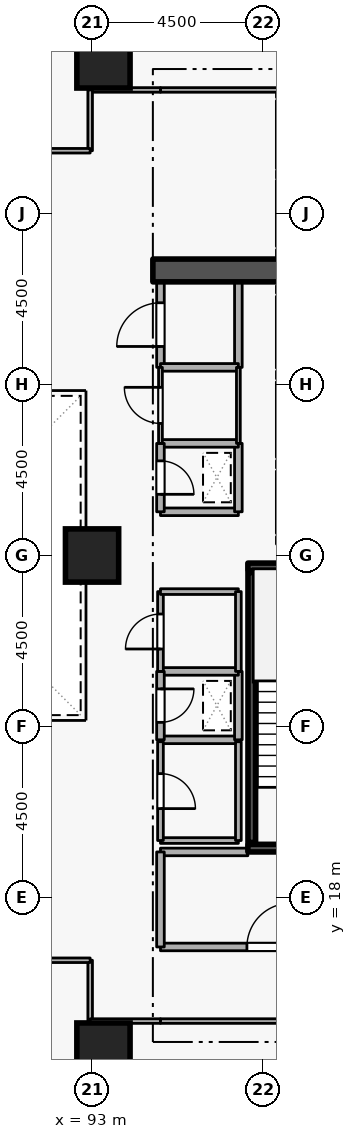
"""IFC4 building model, lengths in metres.
Left out: names, types, materials, properties, quantities, classifications, styles, units other than length and angle.
Written with IfcOpenShell. Run it as: python <this file> out.ifc"""

import sys

from ifc_helpers import new_model, si_unit, direction, frame, frame_2d, origin, origin_2d, place, context, subcontext, project, spatial, rectangle, extrude, element, fill, save


model = new_model("IFC4")
c1 = context("Model", 3, precision=1e-05, world=origin(), true_north=direction((0.0, 1.0)))
c2 = subcontext(c1, "Body", "Model", "MODEL_VIEW")
j1 = project(units=[si_unit("LENGTHUNIT", "METRE"), si_unit("PLANEANGLEUNIT", "RADIAN")], contexts=[c1])
p1 = place(None, origin())
s1 = spatial("IfcSite", under=j1, at=p1, CompositionType="ELEMENT")
p2 = place(p1, origin())
s2 = spatial("IfcBuilding", under=s1, at=p2, CompositionType="ELEMENT")
p3 = place(p2, frame((0.0, 0.0, 31.5)))
s3 = spatial("IfcBuildingStorey", under=s2, at=p3, CompositionType="ELEMENT", Elevation=31.5)
p4 = place(p3, frame((94.6, 34.5, 0.0), z_axis=(0.0, 0.0, 1.0), x_axis=(1.0, 0.0, 0.0)))
e1 = element("IfcWall", 1, at=p4, inside=s3, PredefinedType="SHEAR", context=c2, shape_type="SweptSolid", body=[
    extrude(rectangle(XDim=5.7, YDim=0.6, at=frame_2d((2.85, 0.0))), origin(), (0.0, 0.0, 1.0), 3.6),
])
for number, where, z_axis, x_axis in (
    (2, (93.3, 14.0, 0.0), (0.0, 0.0, 1.0), (1.0, 0.0, 0.0)),
    (3, (93.3, 40.0, 0.0), (0.0, 0.0, 1.0), (1.0, 0.0, 0.0)),
    (4, (93.0, 27.0, 0.0), (0.0, 0.0, 1.0), (1.0, 0.0, 0.0)),
):
    element("IfcColumn", number, at=place(p3, frame(where, z_axis=z_axis, x_axis=x_axis)), inside=s3, PredefinedType="COLUMN", context=c2, shape_type="SweptSolid", body=[
        extrude(rectangle(XDim=1.4, YDim=1.4, at=origin_2d()), origin(), (0.0, 0.0, 1.0), 3.6),
    ])
p5 = place(p3, frame((97.95, 29.22, 0.0), z_axis=(0.0, 0.0, 1.0), x_axis=(0.0, -1.0, 0.0)))
e5 = element("IfcWall", 5, at=p5, inside=s3, PredefinedType="STANDARD", context=c2, shape_type="SweptSolid", body=[
    extrude(rectangle(XDim=1.64, YDim=0.2, at=frame_2d((0.82, 0.0))), origin(), (0.0, 0.0, 1.0), 3.34),
])
p6 = place(p5, frame((0.31, 0.0, 0.0)))
e6 = element("IfcOpeningElement", 6, at=p6, cuts=e5, PredefinedType="OPENING", context=c2, shape_type="SweptSolid", body=[
    extrude(rectangle(XDim=1.02, YDim=2.06, at=frame_2d((0.51, 1.03))), frame((0.0, 0.11, 0.0), z_axis=(0.0, -1.0, 0.0), x_axis=(1.0, 0.0, 0.0)), (0.0, 0.0, 1.0), 0.22),
])
p7 = place(p3, frame((97.95, 31.57, 0.0), z_axis=(0.0, 0.0, 1.0), x_axis=(0.0, -1.0, 0.0)))
e7 = element("IfcWall", 7, at=p7, inside=s3, PredefinedType="STANDARD", context=c2, shape_type="SweptSolid", body=[
    extrude(rectangle(XDim=1.99, YDim=0.2, at=frame_2d((0.995, 0.0))), origin(), (0.0, 0.0, 1.0), 3.34),
])
p8 = place(p3, frame((97.95, 33.82, 0.0), z_axis=(0.0, 0.0, 1.0), x_axis=(0.0, -1.0, 0.0)))
e8 = element("IfcWall", 8, at=p8, inside=s3, PredefinedType="STANDARD", context=c2, shape_type="SweptSolid", body=[
    extrude(rectangle(XDim=1.89, YDim=0.2, at=frame_2d((0.945, 0.0))), origin(), (0.0, 0.0, 1.0), 3.34),
])
p9 = place(p8, frame((0.435, 0.0, 0.0)))
e9 = element("IfcOpeningElement", 9, at=p9, cuts=e8, PredefinedType="OPENING", context=c2, shape_type="SweptSolid", body=[
    extrude(rectangle(XDim=1.02, YDim=2.06, at=frame_2d((0.51, 1.03))), frame((0.0, 0.11, 0.0), z_axis=(0.0, -1.0, 0.0), x_axis=(1.0, 0.0, 0.0)), (0.0, 0.0, 1.0), 0.22),
])
p10 = place(p3, frame((97.95, 36.87, 0.0), z_axis=(0.0, 0.0, 1.0), x_axis=(0.0, -1.0, 0.0)))
e10 = element("IfcWall", 10, at=p10, inside=s3, PredefinedType="STANDARD", context=c2, shape_type="SweptSolid", body=[
    extrude(rectangle(XDim=1.74, YDim=0.2, at=frame_2d((0.87, 0.0))), origin(), (0.0, 0.0, 1.0), 3.34),
])
p11 = place(p10, frame((0.36, 0.0, 0.0)))
e11 = element("IfcOpeningElement", 11, at=p11, cuts=e10, PredefinedType="OPENING", context=c2, shape_type="SweptSolid", body=[
    extrude(rectangle(XDim=1.02, YDim=2.06, at=frame_2d((0.51, 1.03))), frame((0.0, 0.11, 0.0), z_axis=(0.0, -1.0, 0.0), x_axis=(1.0, 0.0, 0.0)), (0.0, 0.0, 1.0), 0.22),
])
p12 = place(p3, frame((97.95, 38.97, 0.0), z_axis=(0.0, 0.0, 1.0), x_axis=(0.0, -1.0, 0.0)))
e12 = element("IfcWall", 12, at=p12, inside=s3, PredefinedType="STANDARD", context=c2, shape_type="SweptSolid", body=[
    extrude(rectangle(XDim=1.79, YDim=0.2, at=frame_2d((0.895, 0.0))), origin(), (0.0, 0.0, 1.0), 3.34),
])
p13 = place(p12, frame((0.385, 0.0, 0.0)))
e13 = element("IfcOpeningElement", 13, at=p13, cuts=e12, PredefinedType="OPENING", context=c2, shape_type="SweptSolid", body=[
    extrude(rectangle(XDim=1.02, YDim=2.06, at=frame_2d((0.51, 1.03))), frame((0.0, 0.11, 0.0), z_axis=(0.0, -1.0, 0.0), x_axis=(1.0, 0.0, 0.0)), (0.0, 0.0, 1.0), 0.22),
])
p14 = place(p3, frame((100.45, 19.3, 0.0), z_axis=(0.0, 0.0, 1.0), x_axis=(-1.0, 0.0, 0.0)))
e14 = element("IfcWall", 14, at=p14, inside=s3, PredefinedType="SHEAR", context=c2, shape_type="SweptSolid", body=[
    extrude(rectangle(XDim=3.35, YDim=0.2, at=frame_2d((1.675, 0.0))), origin(), (0.0, 0.0, 1.0), 3.6),
])
p15 = place(p14, frame((1.125, 0.0, 0.0)))
e15 = element("IfcOpeningElement", 15, at=p15, cuts=e14, PredefinedType="OPENING", context=c2, shape_type="SweptSolid", body=[
    extrude(rectangle(XDim=1.1, YDim=2.1, at=frame_2d((0.55, 1.05))), frame((0.0, 0.11, 0.0), z_axis=(0.0, -1.0, 0.0), x_axis=(1.0, 0.0, 0.0)), (0.0, 0.0, 1.0), 0.22),
])
p16 = place(p3, frame((97.1, 26.7, 0.0), z_axis=(0.0, 0.0, 1.0), x_axis=(1.0, 0.0, 0.0)))
e16 = element("IfcWall", 16, at=p16, inside=s3, PredefinedType="SHEAR", context=c2, shape_type="SweptSolid", body=[
    extrude(rectangle(XDim=3.35, YDim=0.2, at=frame_2d((1.675, 0.0))), origin(), (0.0, 0.0, 1.0), 3.6),
])
p17 = place(p3, frame((97.203, 26.55, 0.0), z_axis=(0.0, 0.0, 1.0), x_axis=(0.0, -1.0, 0.0)))
e17 = element("IfcWall", 17, at=p17, inside=s3, PredefinedType="SHEAR", context=c2, shape_type="SweptSolid", body=[
    extrude(rectangle(XDim=7.1, YDim=0.2, at=frame_2d((3.55, 0.0))), origin(), (0.0, 0.0, 1.0), 3.6),
])
p18 = place(p3, frame((94.8, 16.7, 0.0), z_axis=(0.0, 0.0, 1.0), x_axis=(1.0, 0.0, 0.0)))
e18 = element("IfcWall", 18, at=p18, inside=s3, PredefinedType="STANDARD", context=c2, shape_type="SweptSolid", body=[
    extrude(rectangle(XDim=5.7, YDim=0.2, at=frame_2d((2.85, 0.0))), origin(), (0.0, 0.0, 1.0), 3.34),
])
p19 = place(p18, frame((2.275, 0.0, 0.0)))
e19 = element("IfcOpeningElement", 19, at=p19, cuts=e18, PredefinedType="OPENING", context=c2, shape_type="SweptSolid", body=[
    extrude(rectangle(XDim=1.15, YDim=2.1, at=frame_2d((0.575, 1.05))), frame((0.0, 0.11, 0.0), z_axis=(0.0, -1.0, 0.0), x_axis=(1.0, 0.0, 0.0)), (0.0, 0.0, 1.0), 0.22),
])
p20 = place(p3, frame((97.1, 19.2, 0.0), z_axis=(0.0, 0.0, 1.0), x_axis=(-1.0, 0.0, 0.0)))
e20 = element("IfcWall", 20, at=p20, inside=s3, PredefinedType="STANDARD", context=c2, shape_type="SweptSolid", body=[
    extrude(rectangle(XDim=2.3, YDim=0.2, at=frame_2d((1.15, 0.0))), origin(), (0.0, 0.0, 1.0), 2.545),
])
p21 = place(p3, frame((94.8, 19.2, 0.0), z_axis=(0.0, 0.0, 1.0), x_axis=(0.0, -1.0, 0.0)))
e21 = element("IfcWall", 21, at=p21, inside=s3, PredefinedType="STANDARD", context=c2, shape_type="SweptSolid", body=[
    extrude(rectangle(XDim=2.5, YDim=0.2, at=frame_2d((1.25, 0.0))), origin(), (0.0, 0.0, 1.0), 3.34),
])
p22 = place(p3, frame((94.8, 28.15, 0.0), z_axis=(0.0, 0.0, 1.0), x_axis=(1.0, 0.0, 0.0)))
e22 = element("IfcWall", 22, at=p22, inside=s3, PredefinedType="STANDARD", context=c2, shape_type="SweptSolid", body=[
    extrude(rectangle(XDim=2.05, YDim=0.2, at=frame_2d((1.025, 0.0))), origin(), (0.0, 0.0, 1.0), 3.34),
])
p23 = place(p3, frame((96.85, 28.15, 0.0), z_axis=(0.0, 0.0, 1.0), x_axis=(0.0, 1.0, 0.0)))
e23 = element("IfcWall", 23, at=p23, inside=s3, PredefinedType="STANDARD", context=c2, shape_type="SweptSolid", body=[
    extrude(rectangle(XDim=1.8, YDim=0.2, at=frame_2d((0.9, 0.0))), origin(), (0.0, 0.0, 1.0), 3.34),
])
p24 = place(p3, frame((96.85, 29.95, 0.0), z_axis=(0.0, 0.0, 1.0), x_axis=(-1.0, 0.0, 0.0)))
e24 = element("IfcWall", 24, at=p24, inside=s3, PredefinedType="STANDARD", context=c2, shape_type="SweptSolid", body=[
    extrude(rectangle(XDim=2.05, YDim=0.2, at=frame_2d((1.025, 0.0))), origin(), (0.0, 0.0, 1.0), 3.34),
])
p25 = place(p3, frame((94.8, 29.95, 0.0), z_axis=(0.0, 0.0, 1.0), x_axis=(0.0, -1.0, 0.0)))
e25 = element("IfcWall", 25, at=p25, inside=s3, PredefinedType="STANDARD", context=c2, shape_type="SweptSolid", body=[
    extrude(rectangle(XDim=1.8, YDim=0.2, at=frame_2d((0.9, 0.0))), origin(), (0.0, 0.0, 1.0), 3.34),
])
p26 = place(p25, frame((0.46, 0.0, 0.0)))
e26 = element("IfcOpeningElement", 26, at=p26, cuts=e25, PredefinedType="OPENING", context=c2, shape_type="SweptSolid", body=[
    extrude(rectangle(XDim=0.88, YDim=2.04, at=frame_2d((0.44, 1.02))), frame((0.0, 0.11, 0.0), z_axis=(0.0, -1.0, 0.0), x_axis=(1.0, 0.0, 0.0)), (0.0, 0.0, 1.0), 0.22),
])
p27 = place(p3, frame((94.8, 22.15, 0.0), z_axis=(0.0, 0.0, 1.0), x_axis=(1.0, 0.0, 0.0)))
e27 = element("IfcWall", 27, at=p27, inside=s3, PredefinedType="STANDARD", context=c2, shape_type="SweptSolid", body=[
    extrude(rectangle(XDim=2.05, YDim=0.2, at=frame_2d((1.025, 0.0))), origin(), (0.0, 0.0, 1.0), 3.34),
])
p28 = place(p3, frame((96.85, 22.15, 0.0), z_axis=(0.0, 0.0, 1.0), x_axis=(0.0, 1.0, 0.0)))
e28 = element("IfcWall", 28, at=p28, inside=s3, PredefinedType="STANDARD", context=c2, shape_type="SweptSolid", body=[
    extrude(rectangle(XDim=1.8, YDim=0.2, at=frame_2d((0.9, 0.0))), origin(), (0.0, 0.0, 1.0), 3.34),
])
p29 = place(p3, frame((96.85, 23.95, 0.0), z_axis=(0.0, 0.0, 1.0), x_axis=(-1.0, 0.0, 0.0)))
e29 = element("IfcWall", 29, at=p29, inside=s3, PredefinedType="STANDARD", context=c2, shape_type="SweptSolid", body=[
    extrude(rectangle(XDim=2.05, YDim=0.2, at=frame_2d((1.025, 0.0))), origin(), (0.0, 0.0, 1.0), 3.34),
])
p30 = place(p3, frame((94.8, 23.95, 0.0), z_axis=(0.0, 0.0, 1.0), x_axis=(0.0, -1.0, 0.0)))
e30 = element("IfcWall", 30, at=p30, inside=s3, PredefinedType="STANDARD", context=c2, shape_type="SweptSolid", body=[
    extrude(rectangle(XDim=1.8, YDim=0.2, at=frame_2d((0.9, 0.0))), origin(), (0.0, 0.0, 1.0), 3.34),
])
p31 = place(p30, frame((0.46, 0.0, 0.0)))
e31 = element("IfcOpeningElement", 31, at=p31, cuts=e30, PredefinedType="OPENING", context=c2, shape_type="SweptSolid", body=[
    extrude(rectangle(XDim=0.88, YDim=2.04, at=frame_2d((0.44, 1.02))), frame((0.0, 0.11, 0.0), z_axis=(0.0, -1.0, 0.0), x_axis=(1.0, 0.0, 0.0)), (0.0, 0.0, 1.0), 0.22),
])
p32 = place(p3, frame((94.8, 31.95, 0.0), z_axis=(0.0, 0.0, 1.0), x_axis=(0.0, 1.0, 0.0)))
e32 = element("IfcWall", 32, at=p32, inside=s3, PredefinedType="STANDARD", context=c2, shape_type="SweptSolid", body=[
    extrude(rectangle(XDim=2.25, YDim=0.2, at=frame_2d((1.125, 0.0))), origin(), (0.0, 0.0, 1.0), 3.34),
])
p33 = place(p32, frame((0.55, 0.0, 0.0)))
e33 = element("IfcOpeningElement", 33, at=p33, cuts=e32, PredefinedType="OPENING", context=c2, shape_type="SweptSolid", body=[
    extrude(rectangle(XDim=1.15, YDim=2.1, at=frame_2d((0.575, 1.05))), frame((0.0, 0.11, 0.0), z_axis=(0.0, -1.0, 0.0), x_axis=(1.0, 0.0, 0.0)), (0.0, 0.0, 1.0), 0.22),
])
p34 = place(p3, frame((96.85, 34.2, 0.0), z_axis=(0.0, 0.0, 1.0), x_axis=(0.0, -1.0, 0.0)))
e34 = element("IfcWall", 34, at=p34, inside=s3, PredefinedType="STANDARD", context=c2, shape_type="SweptSolid", body=[
    extrude(rectangle(XDim=2.25, YDim=0.2, at=frame_2d((1.125, 0.0))), origin(), (0.0, 0.0, 1.0), 3.34),
])
p35 = place(p3, frame((96.85, 31.95, 0.0), z_axis=(0.0, 0.0, 1.0), x_axis=(-1.0, 0.0, 0.0)))
e35 = element("IfcWall", 35, at=p35, inside=s3, PredefinedType="STANDARD", context=c2, shape_type="SweptSolid", body=[
    extrude(rectangle(XDim=2.05, YDim=0.2, at=frame_2d((1.025, 0.0))), origin(), (0.0, 0.0, 1.0), 3.34),
])
p36 = place(p3, frame((94.8, 19.5, 0.0), z_axis=(0.0, 0.0, 1.0), x_axis=(1.0, 0.0, 0.0)))
e36 = element("IfcWall", 36, at=p36, inside=s3, PredefinedType="PARTITIONING", context=c2, shape_type="SweptSolid", body=[
    extrude(rectangle(XDim=2.05, YDim=0.15, at=frame_2d((1.025, 0.0))), origin(), (0.0, 0.0, 1.0), 2.545),
])
p37 = place(p3, frame((96.85, 19.5, 0.0), z_axis=(0.0, 0.0, 1.0), x_axis=(0.0, 1.0, 0.0)))
e37 = element("IfcWall", 37, at=p37, inside=s3, PredefinedType="PARTITIONING", context=c2, shape_type="SweptSolid", body=[
    extrude(rectangle(XDim=2.6, YDim=0.15, at=frame_2d((1.3, 0.0))), origin(), (0.0, 0.0, 1.0), 3.34),
])
p38 = place(p3, frame((94.8, 22.1, 0.0), z_axis=(0.0, 0.0, 1.0), x_axis=(0.0, -1.0, 0.0)))
e38 = element("IfcWall", 38, at=p38, inside=s3, PredefinedType="PARTITIONING", context=c2, shape_type="SweptSolid", body=[
    extrude(rectangle(XDim=2.6, YDim=0.15, at=frame_2d((1.3, 0.0))), origin(), (0.0, 0.0, 1.0), 3.34),
])
p39 = place(p38, frame((0.84, 0.0, 0.0)))
e39 = element("IfcOpeningElement", 39, at=p39, cuts=e38, PredefinedType="OPENING", context=c2, shape_type="SweptSolid", body=[
    extrude(rectangle(XDim=0.92, YDim=2.08, at=frame_2d((0.46, 1.04))), frame((0.0, 0.085, 0.0), z_axis=(0.0, -1.0, 0.0), x_axis=(1.0, 0.0, 0.0)), (0.0, 0.0, 1.0), 0.17),
])
p40 = place(p3, frame((94.8, 23.95, 0.0), z_axis=(0.0, 0.0, 1.0), x_axis=(0.0, 1.0, 0.0)))
e40 = element("IfcWall", 40, at=p40, inside=s3, PredefinedType="PARTITIONING", context=c2, shape_type="SweptSolid", body=[
    extrude(rectangle(XDim=2.1, YDim=0.15, at=frame_2d((1.05, 0.0))), origin(), (0.0, 0.0, 1.0), 3.34),
])
p41 = place(p40, frame((0.59, 0.0, 0.0)))
e41 = element("IfcOpeningElement", 41, at=p41, cuts=e40, PredefinedType="OPENING", context=c2, shape_type="SweptSolid", body=[
    extrude(rectangle(XDim=0.92, YDim=2.08, at=frame_2d((0.46, 1.04))), frame((0.0, 0.085, 0.0), z_axis=(0.0, -1.0, 0.0), x_axis=(1.0, 0.0, 0.0)), (0.0, 0.0, 1.0), 0.17),
])
p42 = place(p3, frame((94.8, 26.05, 0.0), z_axis=(0.0, 0.0, 1.0), x_axis=(1.0, 0.0, 0.0)))
e42 = element("IfcWall", 42, at=p42, inside=s3, PredefinedType="PARTITIONING", context=c2, shape_type="SweptSolid", body=[
    extrude(rectangle(XDim=2.05, YDim=0.15, at=frame_2d((1.025, 0.0))), origin(), (0.0, 0.0, 1.0), 3.34),
])
p43 = place(p3, frame((96.85, 26.05, 0.0), z_axis=(0.0, 0.0, 1.0), x_axis=(0.0, -1.0, 0.0)))
e43 = element("IfcWall", 43, at=p43, inside=s3, PredefinedType="PARTITIONING", context=c2, shape_type="SweptSolid", body=[
    extrude(rectangle(XDim=2.1, YDim=0.15, at=frame_2d((1.05, 0.0))), origin(), (0.0, 0.0, 1.0), 3.34),
])
p44 = place(p3, frame((94.8, 29.95, 0.0), z_axis=(0.0, 0.0, 1.0), x_axis=(0.0, 1.0, 0.0)))
e44 = element("IfcWall", 44, at=p44, inside=s3, PredefinedType="PARTITIONING", context=c2, shape_type="SweptSolid", body=[
    extrude(rectangle(XDim=2.0, YDim=0.1, at=frame_2d((1.0, 0.0))), origin(), (0.0, 0.0, 1.0), 3.34),
])
p45 = place(p44, frame((0.525, 0.0, 0.0)))
e45 = element("IfcOpeningElement", 45, at=p45, cuts=e44, PredefinedType="OPENING", context=c2, shape_type="SweptSolid", body=[
    extrude(rectangle(XDim=0.95, YDim=2.1, at=frame_2d((0.475, 1.05))), frame((0.0, 0.06, 0.0), z_axis=(0.0, -1.0, 0.0), x_axis=(1.0, 0.0, 0.0)), (0.0, 0.0, 1.0), 0.12),
])
p46 = place(p3, frame((96.85, 31.95, 0.0), z_axis=(0.0, 0.0, 1.0), x_axis=(0.0, -1.0, 0.0)))
e46 = element("IfcWall", 46, at=p46, inside=s3, PredefinedType="PARTITIONING", context=c2, shape_type="SweptSolid", body=[
    extrude(rectangle(XDim=2.0, YDim=0.1, at=frame_2d((1.0, 0.0))), origin(), (0.0, 0.0, 1.0), 3.34),
])
p47 = place(p3, frame((92.95, 16.35, 0.0), z_axis=(0.0, 0.0, 1.0), x_axis=(0.0, -1.0, 0.0)))
e47 = element("IfcWall", 47, at=p47, inside=s3, PredefinedType="PARTITIONING", context=c2, shape_type="SweptSolid", body=[
    extrude(rectangle(XDim=1.6, YDim=0.12, at=frame_2d((0.8, 0.0))), origin(), (0.0, 0.0, 1.0), 3.34),
])
p48 = place(p3, frame((92.95, 14.75, 0.0), z_axis=(0.0, 0.0, 1.0), x_axis=(1.0, 0.0, 0.0)))
e48 = element("IfcWall", 48, at=p48, inside=s3, PredefinedType="PARTITIONING", context=c2, shape_type="SweptSolid", body=[
    extrude(rectangle(XDim=1.85, YDim=0.12, at=frame_2d((0.925, 0.0))), origin(), (0.0, 0.0, 1.0), 3.34),
])
p49 = place(p3, frame((94.8, 14.75, 0.0), z_axis=(0.0, 0.0, 1.0), x_axis=(1.0, 0.0, 0.0)))
e49 = element("IfcWall", 49, at=p49, inside=s3, PredefinedType="PARTITIONING", context=c2, shape_type="SweptSolid", body=[
    extrude(rectangle(XDim=9.35, YDim=0.12, at=frame_2d((4.675, 0.0))), origin(), (0.0, 0.0, 1.0), 3.34),
])
p50 = place(p49, frame((4.15, 0.0, 0.0)))
e50 = element("IfcOpeningElement", 50, at=p50, cuts=e49, PredefinedType="OPENING", context=c2, shape_type="SweptSolid", body=[
    extrude(rectangle(XDim=1.05, YDim=2.1, at=frame_2d((0.525, 1.05))), frame((0.0, 0.07, 0.0), z_axis=(0.0, -1.0, 0.0), x_axis=(1.0, 0.0, 0.0)), (0.0, 0.0, 1.0), 0.14),
])
p51 = place(p3, frame((88.5, 16.35, 0.0), z_axis=(0.0, 0.0, 1.0), x_axis=(1.0, 0.0, 0.0)))
e51 = element("IfcWall", 51, at=p51, inside=s3, PredefinedType="PARTITIONING", context=c2, shape_type="SweptSolid", body=[
    extrude(rectangle(XDim=4.45, YDim=0.12, at=frame_2d((2.225, 0.0))), origin(), (0.0, 0.0, 1.0), 3.34),
])
p52 = place(p3, frame((97.95, 39.25, 0.0), z_axis=(0.0, 0.0, 1.0), x_axis=(-1.0, 0.0, 0.0)))
e52 = element("IfcWall", 52, at=p52, inside=s3, PredefinedType="PARTITIONING", context=c2, shape_type="SweptSolid", body=[
    extrude(rectangle(XDim=3.15, YDim=0.12, at=frame_2d((1.575, 0.0))), origin(), (0.0, 0.0, 1.0), 3.34),
])
p53 = place(p3, frame((94.8, 39.25, 0.0), z_axis=(0.0, 0.0, 1.0), x_axis=(-1.0, 0.0, 0.0)))
e53 = element("IfcWall", 53, at=p53, inside=s3, PredefinedType="PARTITIONING", context=c2, shape_type="SweptSolid", body=[
    extrude(rectangle(XDim=1.85, YDim=0.12, at=frame_2d((0.925, 0.0))), origin(), (0.0, 0.0, 1.0), 3.34),
])
p54 = place(p3, frame((92.95, 39.25, 0.0), z_axis=(0.0, 0.0, 1.0), x_axis=(0.0, -1.0, 0.0)))
e54 = element("IfcWall", 54, at=p54, inside=s3, PredefinedType="PARTITIONING", context=c2, shape_type="SweptSolid", body=[
    extrude(rectangle(XDim=1.6, YDim=0.12, at=frame_2d((0.8, 0.0))), origin(), (0.0, 0.0, 1.0), 3.34),
])
p55 = place(p3, frame((92.95, 37.65, 0.0), z_axis=(0.0, 0.0, 1.0), x_axis=(-1.0, 0.0, 0.0)))
e55 = element("IfcWall", 55, at=p55, inside=s3, PredefinedType="PARTITIONING", context=c2, shape_type="SweptSolid", body=[
    extrude(rectangle(XDim=4.45, YDim=0.12, at=frame_2d((2.225, 0.0))), origin(), (0.0, 0.0, 1.0), 3.34),
])
p56 = place(p55, frame((1.7, 0.0, 0.0)))
e56 = element("IfcOpeningElement", 56, at=p56, cuts=e55, PredefinedType="OPENING", context=c2, shape_type="SweptSolid", body=[
    extrude(rectangle(XDim=1.05, YDim=2.1, at=frame_2d((0.525, 1.05))), frame((0.0, 0.07, 0.0), z_axis=(0.0, -1.0, 0.0), x_axis=(1.0, 0.0, 0.0)), (0.0, 0.0, 1.0), 0.14),
])
p57 = place(p19, origin())
e57 = element("IfcDoor", 57, at=p57, inside=s3, OperationType="SINGLE_SWING_RIGHT", PredefinedType="DOOR", context=c2, shape_type="SweptSolid", body=[
    extrude(rectangle(XDim=1.15, YDim=2.1, at=frame_2d((0.575, 1.05))), frame((0.0, 0.025, 0.0), z_axis=(0.0, -1.0, 0.0), x_axis=(1.0, 0.0, 0.0)), (0.0, 0.0, 1.0), 0.05),
])
fill(e19, e57)
p58 = place(p26, origin())
e58 = element("IfcDoor", 58, at=p58, inside=s3, OperationType="SINGLE_SWING_RIGHT", PredefinedType="DOOR", context=c2, shape_type="SweptSolid", body=[
    extrude(rectangle(XDim=0.88, YDim=2.04, at=frame_2d((0.44, 1.02))), frame((0.0, 0.025, 0.0), z_axis=(0.0, -1.0, 0.0), x_axis=(1.0, 0.0, 0.0)), (0.0, 0.0, 1.0), 0.05),
])
fill(e26, e58)
p59 = place(p31, origin())
e59 = element("IfcDoor", 59, at=p59, inside=s3, OperationType="SINGLE_SWING_LEFT", PredefinedType="DOOR", context=c2, shape_type="SweptSolid", body=[
    extrude(rectangle(XDim=0.88, YDim=2.04, at=frame_2d((0.44, 1.02))), frame((0.0, 0.025, 0.0), z_axis=(0.0, -1.0, 0.0), x_axis=(1.0, 0.0, 0.0)), (0.0, 0.0, 1.0), 0.05),
])
fill(e31, e59)
p60 = place(p39, origin())
e60 = element("IfcDoor", 60, at=p60, inside=s3, OperationType="SINGLE_SWING_RIGHT", PredefinedType="DOOR", context=c2, shape_type="SweptSolid", body=[
    extrude(rectangle(XDim=0.92, YDim=2.08, at=frame_2d((0.46, 1.04))), frame((0.0, 0.025, 0.0), z_axis=(0.0, -1.0, 0.0), x_axis=(1.0, 0.0, 0.0)), (0.0, 0.0, 1.0), 0.05),
])
fill(e39, e60)
p61 = place(p41, origin())
e61 = element("IfcDoor", 61, at=p61, inside=s3, OperationType="SINGLE_SWING_LEFT", PredefinedType="DOOR", context=c2, shape_type="SweptSolid", body=[
    extrude(rectangle(XDim=0.92, YDim=2.08, at=frame_2d((0.46, 1.04))), frame((0.0, 0.025, 0.0), z_axis=(0.0, -1.0, 0.0), x_axis=(1.0, 0.0, 0.0)), (0.0, 0.0, 1.0), 0.05),
])
fill(e41, e61)
p62 = place(p45, origin())
e62 = element("IfcDoor", 62, at=p62, inside=s3, OperationType="SINGLE_SWING_RIGHT", PredefinedType="DOOR", context=c2, shape_type="SweptSolid", body=[
    extrude(rectangle(XDim=0.95, YDim=2.1, at=frame_2d((0.475, 1.05))), frame((0.0, 0.025, 0.0), z_axis=(0.0, -1.0, 0.0), x_axis=(1.0, 0.0, 0.0)), (0.0, 0.0, 1.0), 0.05),
])
fill(e45, e62)
p63 = place(p33, origin())
e63 = element("IfcDoor", 63, at=p63, inside=s3, OperationType="SINGLE_SWING_LEFT", PredefinedType="DOOR", context=c2, shape_type="SweptSolid", body=[
    extrude(rectangle(XDim=1.15, YDim=2.1, at=frame_2d((0.575, 1.05))), frame((0.0, 0.025, 0.0), z_axis=(0.0, -1.0, 0.0), x_axis=(1.0, 0.0, 0.0)), (0.0, 0.0, 1.0), 0.05),
])
fill(e33, e63)
save(model, sys.argv[1])
